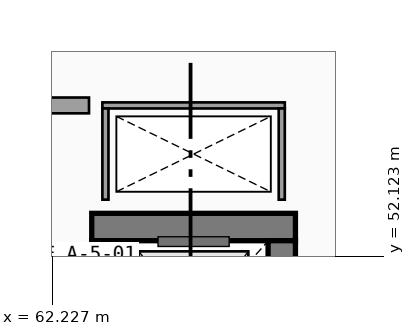
"""IFC4 building model, lengths in metres.
Left out: names, types, materials, properties, quantities, classifications, styles, units other than length and angle.
Written with IfcOpenShell. Run it as: python <this file> out.ifc"""

import sys

from ifc_helpers import new_model, si_unit, direction, frame, frame_2d, origin, place, context, subcontext, project, spatial, rectangle, extrude, element, save


model = new_model("IFC4")
c1 = context("Model", 3, precision=1e-05, world=origin(), true_north=direction((0.0, 1.0)))
c2 = subcontext(c1, "Body", "Model", "MODEL_VIEW")
j1 = project(units=[si_unit("LENGTHUNIT", "METRE"), si_unit("PLANEANGLEUNIT", "RADIAN")], contexts=[c1])
p1 = place(None, origin())
s1 = spatial("IfcSite", under=j1, at=p1, CompositionType="ELEMENT")
p2 = place(p1, origin())
s2 = spatial("IfcBuilding", under=s1, at=p2, CompositionType="ELEMENT")
p3 = place(p2, frame((0.0, 0.0, 4.8)))
s3 = spatial("IfcBuildingStorey", under=s2, at=p3, CompositionType="ELEMENT", Elevation=4.8)
p4 = place(p3, frame((66.225, 52.6, 0.0), z_axis=(0.0, 0.0, 1.0), x_axis=(-1.0, 0.0, 0.0)))
e1 = element("IfcWall", 1, at=p4, inside=s3, PredefinedType="SHEAR", context=c2, shape_type="SweptSolid", body=[
    extrude(rectangle(XDim=3.35, YDim=0.45, at=frame_2d((1.675, 0.0))), origin(), (0.0, 0.0, 1.0), 4.52),
])
p5 = place(p3, frame((63.1, 52.375, 0.0), z_axis=(0.0, 0.0, 1.0), x_axis=(0.0, -1.0, 0.0)))
e2 = element("IfcWall", 2, at=p5, inside=s3, PredefinedType="SHEAR", context=c2, shape_type="SweptSolid", body=[
    extrude(rectangle(XDim=2.75, YDim=0.45, at=frame_2d((1.375, 0.0))), origin(), (0.0, 0.0, 1.0), 4.52),
])
p6 = place(p5, frame((0.725, 0.0, 0.0), z_axis=(0.0, 0.0, 1.0), x_axis=(1.0, 0.0, 0.0)))
e3 = element("IfcOpeningElement", 3, at=p6, cuts=e2, PredefinedType="OPENING", context=c2, shape_type="SweptSolid", body=[
    extrude(rectangle(XDim=1.3, YDim=2.25, at=frame_2d((0.65, 1.125))), frame((0.0, 0.235, 0.0), z_axis=(0.0, -1.0, 0.0), x_axis=(1.0, 0.0, 0.0)), (0.0, 0.0, 1.0), 0.47),
])
p7 = place(p3, frame((66.0, 49.625, 0.0), z_axis=(0.0, 0.0, 1.0), x_axis=(0.0, 1.0, 0.0)))
e4 = element("IfcWall", 4, at=p7, inside=s3, PredefinedType="SHEAR", context=c2, shape_type="SweptSolid", body=[
    extrude(rectangle(XDim=2.75, YDim=0.45, at=frame_2d((1.375, 0.0))), origin(), (0.0, 0.0, 1.0), 4.52),
])
p8 = place(p3, frame((66.05, 54.6, 0.0), z_axis=(0.0, 0.0, 1.0), x_axis=(-1.0, 0.0, 0.0)))
e5 = element("IfcWall", 5, at=p8, inside=s3, PredefinedType="PARTITIONING", context=c2, shape_type="SweptSolid", body=[
    extrude(rectangle(XDim=3.0, YDim=0.1, at=frame_2d((1.5, 0.0))), origin(), (0.0, 0.0, 1.0), 4.52),
])
for number, where, z_axis, x_axis in (
    (6, (63.1, 54.55, 0.0), (0.0, 0.0, 1.0), (0.0, -1.0, 0.0)),
    (7, (66.0, 53.05, 0.0), (0.0, 0.0, 1.0), (0.0, 1.0, 0.0)),
):
    element("IfcWall", number, at=place(p3, frame(where, z_axis=z_axis, x_axis=x_axis)), inside=s3, PredefinedType="PARTITIONING", context=c2, shape_type="SweptSolid", body=[
        extrude(rectangle(XDim=1.5, YDim=0.1, at=frame_2d((0.75, 0.0))), origin(), (0.0, 0.0, 1.0), 4.52),
    ])
p9 = place(p3, frame((62.83, 54.6, 0.0), z_axis=(0.0, 0.0, 1.0), x_axis=(-1.0, 0.0, 0.0)))
e8 = element("IfcWall", 8, at=p9, inside=s3, PredefinedType="SOLIDWALL", context=c2, shape_type="SweptSolid", body=[
    extrude(rectangle(XDim=3.76, YDim=0.26, at=frame_2d((1.88, 0.0))), origin(), (0.0, 0.0, 1.0), 4.52),
])
save(model, sys.argv[1])
